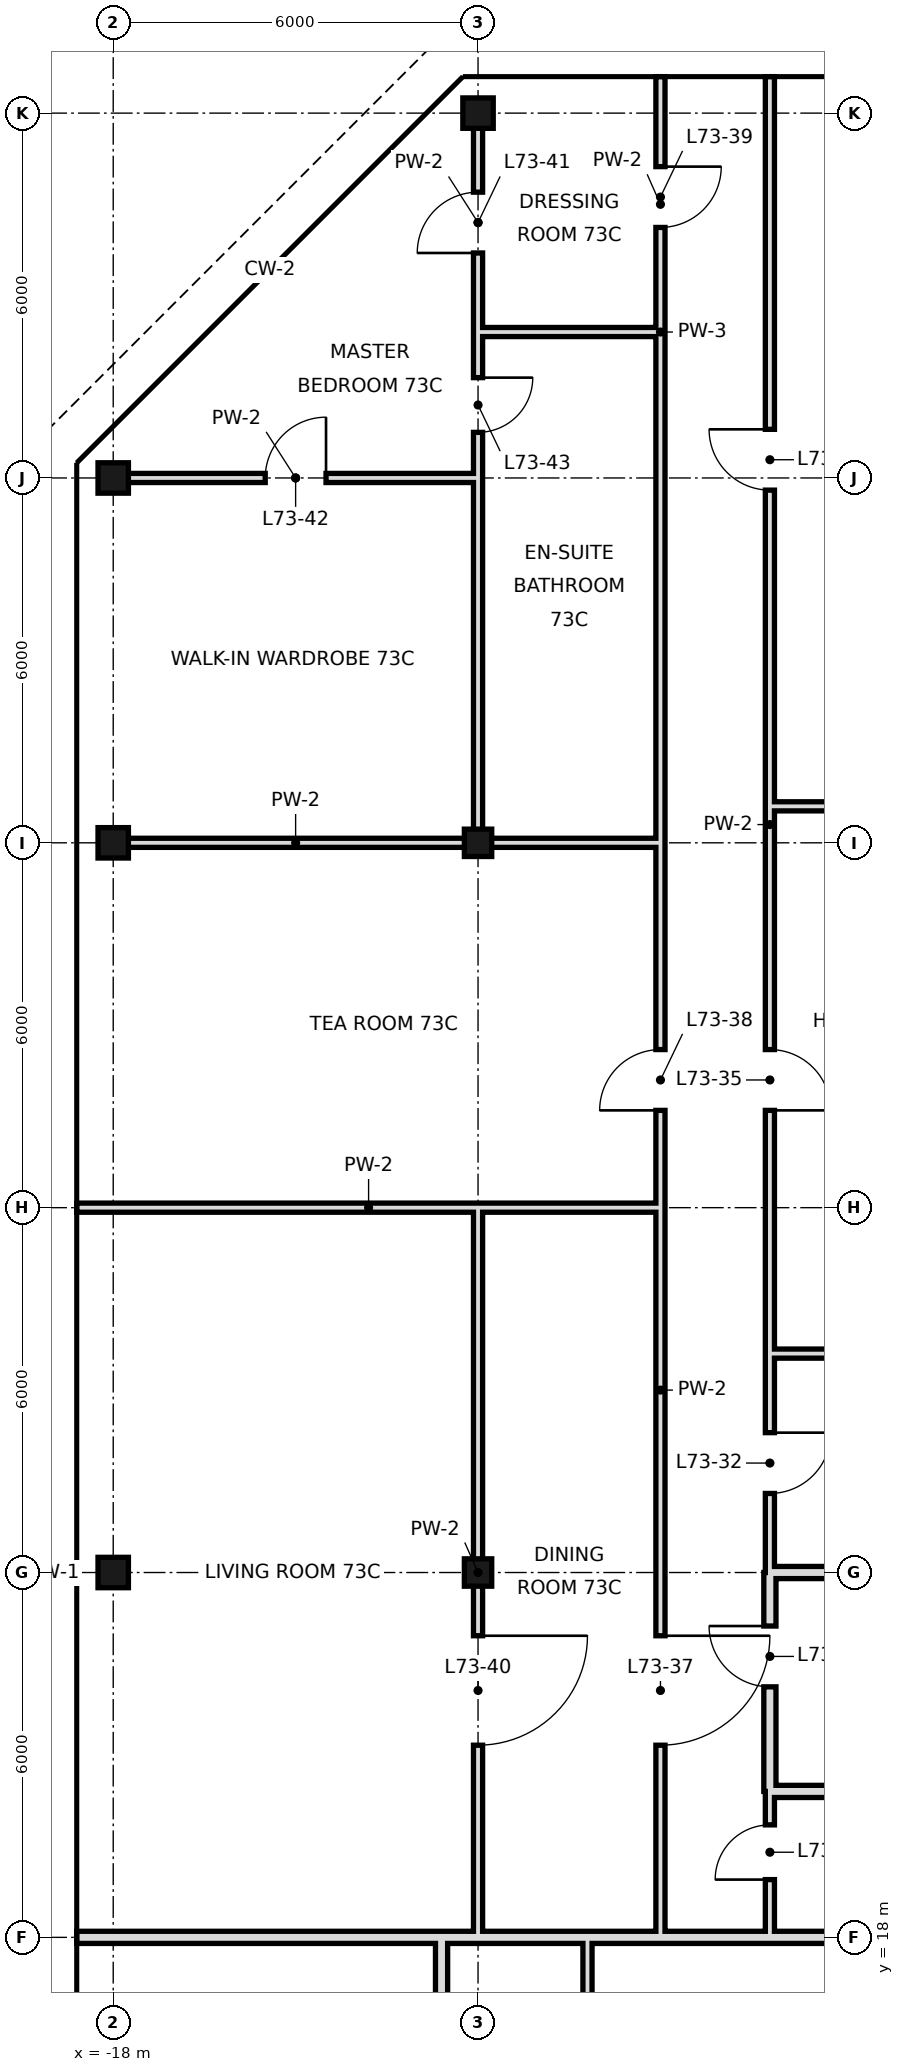
"""IFC4 building model, lengths in metres.
Left out: names, types, materials, properties, quantities, classifications, styles, units other than length and angle.
Written with IfcOpenShell. Run it as: python <this file> out.ifc"""

import sys

from ifc_helpers import new_model, si_unit, direction, frame, frame_2d, origin, origin_2d, place, context, subcontext, project, spatial, rectangle, hollow_rectangle, extrude, element, fill, save


model = new_model("IFC4")
c1 = context("Model", 3, precision=1e-05, world=origin(), true_north=direction((0.0, 1.0)))
c2 = subcontext(c1, "Body", "Model", "MODEL_VIEW")
j1 = project(units=[si_unit("LENGTHUNIT", "METRE"), si_unit("PLANEANGLEUNIT", "RADIAN")], contexts=[c1])
p1 = place(None, origin())
s1 = spatial("IfcSite", under=j1, at=p1, CompositionType="ELEMENT")
p2 = place(p1, origin())
s2 = spatial("IfcBuilding", under=s1, at=p2, CompositionType="ELEMENT")
p3 = place(p2, frame((0.0, 0.0, 308.8)))
s3 = spatial("IfcBuildingStorey", under=s2, at=p3, CompositionType="ELEMENT", Elevation=308.8)
for number, where, z_axis, x_axis in (
    (1, (-18.0, 24.0, 0.0), (0.0, 0.0, 1.0), (1.0, 0.0, 0.0)),
    (2, (-18.0, 36.0, 0.0), (0.0, 0.0, 1.0), (1.0, 0.0, 0.0)),
    (3, (-18.0, 42.0, 0.0), (0.0, 0.0, 1.0), (1.0, 0.0, 0.0)),
):
    element("IfcColumn", number, at=place(p3, frame(where, z_axis=z_axis, x_axis=x_axis)), inside=s3, PredefinedType="COLUMN", context=c2, shape_type="SweptSolid", body=[
        extrude(hollow_rectangle(XDim=0.5, YDim=0.5, WallThickness=0.025, at=origin_2d()), origin(), (0.0, 0.0, 1.0), 3.6),
    ])
for number, where, z_axis, x_axis in (
    (4, (-12.0, 24.0, 0.0), (0.0, 0.0, 1.0), (1.0, 0.0, 0.0)),
    (5, (-12.0, 36.0, 0.0), (0.0, 0.0, 1.0), (1.0, 0.0, 0.0)),
):
    element("IfcColumn", number, at=place(p3, frame(where, z_axis=z_axis, x_axis=x_axis)), inside=s3, PredefinedType="COLUMN", context=c2, shape_type="SweptSolid", body=[
        extrude(hollow_rectangle(XDim=0.45, YDim=0.45, WallThickness=0.022, at=origin_2d()), origin(), (0.0, 0.0, 1.0), 3.6),
    ])
p4 = place(p3, frame((-12.0, 48.0, 0.0), z_axis=(0.0, 0.0, 1.0), x_axis=(1.0, 0.0, 0.0)))
e6 = element("IfcColumn", 6, at=p4, inside=s3, PredefinedType="COLUMN", context=c2, shape_type="SweptSolid", body=[
    extrude(hollow_rectangle(XDim=0.5, YDim=0.5, WallThickness=0.025, at=origin_2d()), origin(), (0.0, 0.0, 1.0), 3.6),
])
p5 = place(p3, frame((-10.2, 10.8, 0.0), z_axis=(0.0, 0.0, 1.0), x_axis=(0.0, 1.0, 0.0)))
e7 = element("IfcWall", 7, at=p5, inside=s3, PredefinedType="PARTITIONING", context=c2, shape_type="SweptSolid", body=[
    extrude(rectangle(XDim=7.2, YDim=0.15, at=frame_2d((3.6, 0.0))), origin(), (0.0, 0.0, 1.0), 3.42),
])
p6 = place(p3, frame((-12.0, 18.0, 0.0), z_axis=(0.0, 0.0, 1.0), x_axis=(0.0, 1.0, 0.0)))
e8 = element("IfcWall", 8, at=p6, inside=s3, PredefinedType="PARTITIONING", context=c2, shape_type="SweptSolid", body=[
    extrude(rectangle(XDim=12.0, YDim=0.15, at=frame_2d((6.0, 0.0))), origin(), (0.0, 0.0, 1.0), 2.72),
])
p7 = place(p6, frame((3.16, 0.0, 0.0)))
e9 = element("IfcOpeningElement", 9, at=p7, cuts=e8, PredefinedType="OPENING", context=c2, shape_type="SweptSolid", body=[
    extrude(rectangle(XDim=1.8, YDim=2.4, at=frame_2d((0.9, 1.2))), frame((0.0, 0.085, 0.0), z_axis=(0.0, -1.0, 0.0), x_axis=(1.0, 0.0, 0.0)), (0.0, 0.0, 1.0), 0.17),
])
p8 = place(p3, frame((-12.0, 44.4, 0.0), z_axis=(0.0, 0.0, 1.0), x_axis=(0.0, 1.0, 0.0)))
e10 = element("IfcWall", 10, at=p8, inside=s3, PredefinedType="PARTITIONING", context=c2, shape_type="SweptSolid", body=[
    extrude(rectangle(XDim=3.6, YDim=0.15, at=frame_2d((1.8, 0.0))), origin(), (0.0, 0.0, 1.0), 2.72),
])
p9 = place(p8, frame((1.3, 0.0, 0.0)))
e11 = element("IfcOpeningElement", 11, at=p9, cuts=e10, PredefinedType="OPENING", context=c2, shape_type="SweptSolid", body=[
    extrude(rectangle(XDim=1.0, YDim=2.4, at=frame_2d((0.5, 1.2))), frame((0.0, 0.085, 0.0), z_axis=(0.0, -1.0, 0.0), x_axis=(1.0, 0.0, 0.0)), (0.0, 0.0, 1.0), 0.17),
])
p10 = place(p3, frame((-12.0, 36.0, 0.0), z_axis=(0.0, 0.0, 1.0), x_axis=(0.0, 1.0, 0.0)))
e12 = element("IfcWall", 12, at=p10, inside=s3, PredefinedType="PARTITIONING", context=c2, shape_type="SweptSolid", body=[
    extrude(rectangle(XDim=8.4, YDim=0.15, at=frame_2d((4.2, 0.0))), origin(), (0.0, 0.0, 1.0), 2.72),
])
p11 = place(p10, frame((6.75, 0.0, 0.0)))
e13 = element("IfcOpeningElement", 13, at=p11, cuts=e12, PredefinedType="OPENING", context=c2, shape_type="SweptSolid", body=[
    extrude(rectangle(XDim=0.9, YDim=2.4, at=frame_2d((0.45, 1.2))), frame((0.0, 0.085, 0.0), z_axis=(0.0, -1.0, 0.0), x_axis=(1.0, 0.0, 0.0)), (0.0, 0.0, 1.0), 0.17),
])
p12 = place(p3, frame((-12.6, 10.8, 0.0), z_axis=(0.0, 0.0, 1.0), x_axis=(0.0, 1.0, 0.0)))
e14 = element("IfcWall", 14, at=p12, inside=s3, PredefinedType="SOLIDWALL", context=c2, shape_type="SweptSolid", body=[
    extrude(rectangle(XDim=7.2, YDim=0.2, at=frame_2d((3.6, 0.0))), origin(), (0.0, 0.0, 1.0), 2.97),
])
p13 = place(p3, frame((-7.2, 20.4, 0.0), z_axis=(0.0, 0.0, 1.0), x_axis=(0.0, 1.0, 0.0)))
e15 = element("IfcWall", 15, at=p13, inside=s3, PredefinedType="SOLIDWALL", context=c2, shape_type="SweptSolid", body=[
    extrude(rectangle(XDim=3.6, YDim=0.2, at=frame_2d((1.8, 0.0))), origin(), (0.0, 0.0, 1.0), 2.72),
])
p14 = place(p13, frame((1.72, 0.0, 0.0)))
e16 = element("IfcOpeningElement", 16, at=p14, cuts=e15, PredefinedType="OPENING", context=c2, shape_type="SweptSolid", body=[
    extrude(rectangle(XDim=1.0, YDim=2.4, at=frame_2d((0.5, 1.2))), frame((0.0, 0.11, 0.0), z_axis=(0.0, -1.0, 0.0), x_axis=(1.0, 0.0, 0.0)), (0.0, 0.0, 1.0), 0.22),
])
p15 = place(p3, frame((-7.2, 24.0, 0.0), z_axis=(0.0, 0.0, 1.0), x_axis=(0.0, 1.0, 0.0)))
e17 = element("IfcWall", 17, at=p15, inside=s3, PredefinedType="PARTITIONING", context=c2, shape_type="SweptSolid", body=[
    extrude(rectangle(XDim=24.6, YDim=0.15, at=frame_2d((12.3, 0.0))), origin(), (0.0, 0.0, 1.0), 3.42),
])
p16 = place(p15, frame((1.3, 0.0, 0.0)))
e18 = element("IfcOpeningElement", 18, at=p16, cuts=e17, PredefinedType="OPENING", context=c2, shape_type="SweptSolid", body=[
    extrude(rectangle(XDim=1.0, YDim=2.4, at=frame_2d((0.5, 1.2))), frame((0.0, 0.085, 0.0), z_axis=(0.0, -1.0, 0.0), x_axis=(1.0, 0.0, 0.0)), (0.0, 0.0, 1.0), 0.17),
])
p17 = place(p15, frame((7.6, 0.0, 0.0)))
e19 = element("IfcOpeningElement", 19, at=p17, cuts=e17, PredefinedType="OPENING", context=c2, shape_type="SweptSolid", body=[
    extrude(rectangle(XDim=1.0, YDim=2.4, at=frame_2d((0.5, 1.2))), frame((0.0, 0.085, 0.0), z_axis=(0.0, -1.0, 0.0), x_axis=(1.0, 0.0, 0.0)), (0.0, 0.0, 1.0), 0.17),
])
p18 = place(p15, frame((17.8, 0.0, 0.0)))
e20 = element("IfcOpeningElement", 20, at=p18, cuts=e17, PredefinedType="OPENING", context=c2, shape_type="SweptSolid", body=[
    extrude(rectangle(XDim=1.0, YDim=2.4, at=frame_2d((0.5, 1.2))), frame((0.0, 0.085, 0.0), z_axis=(0.0, -1.0, 0.0), x_axis=(1.0, 0.0, 0.0)), (0.0, 0.0, 1.0), 0.17),
])
p19 = place(p3, frame((-7.2, 18.0, 0.0), z_axis=(0.0, 0.0, 1.0), x_axis=(0.0, 1.0, 0.0)))
e21 = element("IfcWall", 21, at=p19, inside=s3, PredefinedType="PARTITIONING", context=c2, shape_type="SweptSolid", body=[
    extrude(rectangle(XDim=2.4, YDim=0.15, at=frame_2d((1.2, 0.0))), origin(), (0.0, 0.0, 1.0), 3.42),
])
p20 = place(p19, frame((0.95, 0.0, 0.0)))
e22 = element("IfcOpeningElement", 22, at=p20, cuts=e21, PredefinedType="OPENING", context=c2, shape_type="SweptSolid", body=[
    extrude(rectangle(XDim=0.9, YDim=2.4, at=frame_2d((0.45, 1.2))), frame((0.0, 0.085, 0.0), z_axis=(0.0, -1.0, 0.0), x_axis=(1.0, 0.0, 0.0)), (0.0, 0.0, 1.0), 0.17),
])
p21 = place(p3, frame((-9.0, 18.0, 0.0), z_axis=(0.0, 0.0, 1.0), x_axis=(0.0, 1.0, 0.0)))
e23 = element("IfcWall", 23, at=p21, inside=s3, PredefinedType="PARTITIONING", context=c2, shape_type="SweptSolid", body=[
    extrude(rectangle(XDim=18.0, YDim=0.15, at=frame_2d((9.0, 0.0))), origin(), (0.0, 0.0, 1.0), 3.42),
])
p22 = place(p21, frame((3.16, 0.0, 0.0)))
e24 = element("IfcOpeningElement", 24, at=p22, cuts=e23, PredefinedType="OPENING", context=c2, shape_type="SweptSolid", body=[
    extrude(rectangle(XDim=1.8, YDim=2.4, at=frame_2d((0.9, 1.2))), frame((0.0, 0.085, 0.0), z_axis=(0.0, -1.0, 0.0), x_axis=(1.0, 0.0, 0.0)), (0.0, 0.0, 1.0), 0.17),
])
p23 = place(p21, frame((13.6, 0.0, 0.0)))
e25 = element("IfcOpeningElement", 25, at=p23, cuts=e23, PredefinedType="OPENING", context=c2, shape_type="SweptSolid", body=[
    extrude(rectangle(XDim=1.0, YDim=2.4, at=frame_2d((0.5, 1.2))), frame((0.0, 0.085, 0.0), z_axis=(0.0, -1.0, 0.0), x_axis=(1.0, 0.0, 0.0)), (0.0, 0.0, 1.0), 0.17),
])
p24 = place(p3, frame((-9.0, 44.4, 0.0), z_axis=(0.0, 0.0, 1.0), x_axis=(0.0, 1.0, 0.0)))
e26 = element("IfcWall", 26, at=p24, inside=s3, PredefinedType="PARTITIONING", context=c2, shape_type="SweptSolid", body=[
    extrude(rectangle(XDim=4.2, YDim=0.15, at=frame_2d((2.1, 0.0))), origin(), (0.0, 0.0, 1.0), 3.42),
])
p25 = place(p24, frame((1.72, 0.0, 0.0)))
e27 = element("IfcOpeningElement", 27, at=p25, cuts=e26, PredefinedType="OPENING", context=c2, shape_type="SweptSolid", body=[
    extrude(rectangle(XDim=1.0, YDim=2.4, at=frame_2d((0.5, 1.2))), frame((0.0, 0.085, 0.0), z_axis=(0.0, -1.0, 0.0), x_axis=(1.0, 0.0, 0.0)), (0.0, 0.0, 1.0), 0.17),
])
p26 = place(p3, frame((-9.0, 36.0, 0.0), z_axis=(0.0, 0.0, 1.0), x_axis=(0.0, 1.0, 0.0)))
e28 = element("IfcWall", 28, at=p26, inside=s3, PredefinedType="PARTITIONING", context=c2, shape_type="SweptSolid", body=[
    extrude(rectangle(XDim=8.4, YDim=0.15, at=frame_2d((4.2, 0.0))), origin(), (0.0, 0.0, 1.0), 3.42),
])
p27 = place(p3, frame((-18.6, 18.0, 0.0), z_axis=(0.0, 0.0, 1.0), x_axis=(1.0, 0.0, 0.0)))
e29 = element("IfcWall", 29, at=p27, inside=s3, PredefinedType="SOLIDWALL", context=c2, shape_type="SweptSolid", body=[
    extrude(rectangle(XDim=6.0, YDim=0.2, at=frame_2d((3.0, 0.0))), origin(), (0.0, 0.0, 1.0), 2.72),
])
p28 = place(p3, frame((-12.6, 18.0, 0.0), z_axis=(0.0, 0.0, 1.0), x_axis=(1.0, 0.0, 0.0)))
e30 = element("IfcWall", 30, at=p28, inside=s3, PredefinedType="SOLIDWALL", context=c2, shape_type="SweptSolid", body=[
    extrude(rectangle(XDim=15.7, YDim=0.2, at=frame_2d((7.85, 0.0))), origin(), (0.0, 0.0, 1.0), 2.72),
])
for number, where, z_axis, x_axis in (
    (31, (-7.2, 20.4, 0.0), (0.0, 0.0, 1.0), (1.0, 0.0, 0.0)),
    (32, (-7.2, 24.0, 0.0), (0.0, 0.0, 1.0), (1.0, 0.0, 0.0)),
):
    element("IfcWall", number, at=place(p3, frame(where, z_axis=z_axis, x_axis=x_axis)), inside=s3, PredefinedType="SOLIDWALL", context=c2, shape_type="SweptSolid", body=[
        extrude(rectangle(XDim=10.3, YDim=0.2, at=frame_2d((5.15, 0.0))), origin(), (0.0, 0.0, 1.0), 2.72),
    ])
p29 = place(p3, frame((-7.2, 27.6, 0.0), z_axis=(0.0, 0.0, 1.0), x_axis=(1.0, 0.0, 0.0)))
e33 = element("IfcWall", 33, at=p29, inside=s3, PredefinedType="PARTITIONING", context=c2, shape_type="SweptSolid", body=[
    extrude(rectangle(XDim=10.3, YDim=0.15, at=frame_2d((5.15, 0.0))), origin(), (0.0, 0.0, 1.0), 3.42),
])
p30 = place(p3, frame((-18.6, 30.0, 0.0), z_axis=(0.0, 0.0, 1.0), x_axis=(1.0, 0.0, 0.0)))
e34 = element("IfcWall", 34, at=p30, inside=s3, PredefinedType="PARTITIONING", context=c2, shape_type="SweptSolid", body=[
    extrude(rectangle(XDim=9.6, YDim=0.15, at=frame_2d((4.8, 0.0))), origin(), (0.0, 0.0, 1.0), 2.72),
])
p31 = place(p3, frame((-18.0, 36.0, 0.0), z_axis=(0.0, 0.0, 1.0), x_axis=(1.0, 0.0, 0.0)))
e35 = element("IfcWall", 35, at=p31, inside=s3, PredefinedType="PARTITIONING", context=c2, shape_type="SweptSolid", body=[
    extrude(rectangle(XDim=6.0, YDim=0.15, at=frame_2d((3.0, 0.0))), origin(), (0.0, 0.0, 1.0), 2.97),
])
p32 = place(p3, frame((-12.0, 36.0, 0.0), z_axis=(0.0, 0.0, 1.0), x_axis=(1.0, 0.0, 0.0)))
e36 = element("IfcWall", 36, at=p32, inside=s3, PredefinedType="PARTITIONING", context=c2, shape_type="SweptSolid", body=[
    extrude(rectangle(XDim=3.0, YDim=0.15, at=frame_2d((1.5, 0.0))), origin(), (0.0, 0.0, 1.0), 2.72),
])
p33 = place(p3, frame((-7.2, 36.6, 0.0), z_axis=(0.0, 0.0, 1.0), x_axis=(1.0, 0.0, 0.0)))
e37 = element("IfcWall", 37, at=p33, inside=s3, PredefinedType="PARTITIONING", context=c2, shape_type="SweptSolid", body=[
    extrude(rectangle(XDim=10.3, YDim=0.15, at=frame_2d((5.15, 0.0))), origin(), (0.0, 0.0, 1.0), 3.42),
])
p34 = place(p3, frame((-18.0, 42.0, 0.0), z_axis=(0.0, 0.0, 1.0), x_axis=(1.0, 0.0, 0.0)))
e38 = element("IfcWall", 38, at=p34, inside=s3, PredefinedType="PARTITIONING", context=c2, shape_type="SweptSolid", body=[
    extrude(rectangle(XDim=6.0, YDim=0.15, at=frame_2d((3.0, 0.0))), origin(), (0.0, 0.0, 1.0), 2.97),
])
p35 = place(p34, frame((2.5, 0.0, 0.0)))
e39 = element("IfcOpeningElement", 39, at=p35, cuts=e38, PredefinedType="OPENING", context=c2, shape_type="SweptSolid", body=[
    extrude(rectangle(XDim=1.0, YDim=2.4, at=frame_2d((0.5, 1.2))), frame((0.0, 0.085, 0.0), z_axis=(0.0, -1.0, 0.0), x_axis=(1.0, 0.0, 0.0)), (0.0, 0.0, 1.0), 0.17),
])
p36 = place(p3, frame((-12.0, 44.4, 0.0), z_axis=(0.0, 0.0, 1.0), x_axis=(1.0, 0.0, 0.0)))
e40 = element("IfcWall", 40, at=p36, inside=s3, PredefinedType="PARTITIONING", context=c2, shape_type="SweptSolid", body=[
    extrude(rectangle(XDim=3.0, YDim=0.15, at=frame_2d((1.5, 0.0))), origin(), (0.0, 0.0, 1.0), 3.42),
])
p37 = place(p16, origin())
e41 = element("IfcDoor", 41, at=p37, inside=s3, OperationType="SINGLE_SWING_RIGHT", PredefinedType="DOOR", context=c2, shape_type="SweptSolid", body=[
    extrude(rectangle(XDim=1.0, YDim=2.4, at=frame_2d((0.5, 1.2))), frame((0.0, 0.025, 0.0), z_axis=(0.0, -1.0, 0.0), x_axis=(1.0, 0.0, 0.0)), (0.0, 0.0, 1.0), 0.05),
])
fill(e18, e41)
p38 = place(p20, origin())
e42 = element("IfcDoor", 42, at=p38, inside=s3, OperationType="SINGLE_SWING_LEFT", PredefinedType="DOOR", context=c2, shape_type="SweptSolid", body=[
    extrude(rectangle(XDim=0.9, YDim=2.4, at=frame_2d((0.45, 1.2))), frame((0.0, 0.025, 0.0), z_axis=(0.0, -1.0, 0.0), x_axis=(1.0, 0.0, 0.0)), (0.0, 0.0, 1.0), 0.05),
])
fill(e22, e42)
p39 = place(p14, frame((1.0, 0.0, 0.0), z_axis=(0.0, 0.0, 1.0), x_axis=(-1.0, 0.0, 0.0)))
e43 = element("IfcDoor", 43, at=p39, inside=s3, OperationType="SINGLE_SWING_LEFT", PredefinedType="DOOR", context=c2, shape_type="SweptSolid", body=[
    extrude(rectangle(XDim=1.0, YDim=2.4, at=frame_2d((0.5, 1.2))), frame((0.0, 0.025, 0.0), z_axis=(0.0, -1.0, 0.0), x_axis=(1.0, 0.0, 0.0)), (0.0, 0.0, 1.0), 0.05),
])
fill(e16, e43)
p40 = place(p17, frame((1.0, 0.0, 0.0), z_axis=(0.0, 0.0, 1.0), x_axis=(-1.0, 0.0, 0.0)))
e44 = element("IfcDoor", 44, at=p40, inside=s3, OperationType="SINGLE_SWING_RIGHT", PredefinedType="DOOR", context=c2, shape_type="SweptSolid", body=[
    extrude(rectangle(XDim=1.0, YDim=2.4, at=frame_2d((0.5, 1.2))), frame((0.0, 0.025, 0.0), z_axis=(0.0, -1.0, 0.0), x_axis=(1.0, 0.0, 0.0)), (0.0, 0.0, 1.0), 0.05),
])
fill(e19, e44)
p41 = place(p18, frame((1.0, 0.0, 0.0), z_axis=(0.0, 0.0, 1.0), x_axis=(-1.0, 0.0, 0.0)))
e45 = element("IfcDoor", 45, at=p41, inside=s3, OperationType="SINGLE_SWING_LEFT", PredefinedType="DOOR", context=c2, shape_type="SweptSolid", body=[
    extrude(rectangle(XDim=1.0, YDim=2.4, at=frame_2d((0.5, 1.2))), frame((0.0, 0.025, 0.0), z_axis=(0.0, -1.0, 0.0), x_axis=(1.0, 0.0, 0.0)), (0.0, 0.0, 1.0), 0.05),
])
fill(e20, e45)
p42 = place(p22, origin())
e46 = element("IfcDoor", 46, at=p42, inside=s3, OperationType="SINGLE_SWING_RIGHT", PredefinedType="DOOR", context=c2, shape_type="SweptSolid", body=[
    extrude(rectangle(XDim=1.8, YDim=2.4, at=frame_2d((0.9, 1.2))), frame((0.0, 0.025, 0.0), z_axis=(0.0, -1.0, 0.0), x_axis=(1.0, 0.0, 0.0)), (0.0, 0.0, 1.0), 0.05),
])
fill(e24, e46)
p43 = place(p23, origin())
e47 = element("IfcDoor", 47, at=p43, inside=s3, OperationType="SINGLE_SWING_LEFT", PredefinedType="DOOR", context=c2, shape_type="SweptSolid", body=[
    extrude(rectangle(XDim=1.0, YDim=2.4, at=frame_2d((0.5, 1.2))), frame((0.0, 0.025, 0.0), z_axis=(0.0, -1.0, 0.0), x_axis=(1.0, 0.0, 0.0)), (0.0, 0.0, 1.0), 0.05),
])
fill(e25, e47)
p44 = place(p25, origin())
e48 = element("IfcDoor", 48, at=p44, inside=s3, OperationType="SINGLE_SWING_RIGHT", PredefinedType="DOOR", context=c2, shape_type="SweptSolid", body=[
    extrude(rectangle(XDim=1.0, YDim=2.4, at=frame_2d((0.5, 1.2))), frame((0.0, 0.025, 0.0), z_axis=(0.0, -1.0, 0.0), x_axis=(1.0, 0.0, 0.0)), (0.0, 0.0, 1.0), 0.05),
])
fill(e27, e48)
p45 = place(p7, origin())
e49 = element("IfcDoor", 49, at=p45, inside=s3, OperationType="SINGLE_SWING_RIGHT", PredefinedType="DOOR", context=c2, shape_type="SweptSolid", body=[
    extrude(rectangle(XDim=1.8, YDim=2.4, at=frame_2d((0.9, 1.2))), frame((0.0, 0.025, 0.0), z_axis=(0.0, -1.0, 0.0), x_axis=(1.0, 0.0, 0.0)), (0.0, 0.0, 1.0), 0.05),
])
fill(e9, e49)
p46 = place(p9, origin())
e50 = element("IfcDoor", 50, at=p46, inside=s3, OperationType="SINGLE_SWING_LEFT", PredefinedType="DOOR", context=c2, shape_type="SweptSolid", body=[
    extrude(rectangle(XDim=1.0, YDim=2.4, at=frame_2d((0.5, 1.2))), frame((0.0, 0.025, 0.0), z_axis=(0.0, -1.0, 0.0), x_axis=(1.0, 0.0, 0.0)), (0.0, 0.0, 1.0), 0.05),
])
fill(e11, e50)
p47 = place(p35, frame((1.0, 0.0, 0.0), z_axis=(0.0, 0.0, 1.0), x_axis=(-1.0, 0.0, 0.0)))
e51 = element("IfcDoor", 51, at=p47, inside=s3, OperationType="SINGLE_SWING_LEFT", PredefinedType="DOOR", context=c2, shape_type="SweptSolid", body=[
    extrude(rectangle(XDim=1.0, YDim=2.4, at=frame_2d((0.5, 1.2))), frame((0.0, 0.025, 0.0), z_axis=(0.0, -1.0, 0.0), x_axis=(1.0, 0.0, 0.0)), (0.0, 0.0, 1.0), 0.05),
])
fill(e39, e51)
p48 = place(p11, origin())
e52 = element("IfcDoor", 52, at=p48, inside=s3, OperationType="SINGLE_SWING_RIGHT", PredefinedType="DOOR", context=c2, shape_type="SweptSolid", body=[
    extrude(rectangle(XDim=0.9, YDim=2.4, at=frame_2d((0.45, 1.2))), frame((0.0, 0.025, 0.0), z_axis=(0.0, -1.0, 0.0), x_axis=(1.0, 0.0, 0.0)), (0.0, 0.0, 1.0), 0.05),
])
fill(e13, e52)
save(model, sys.argv[1])
